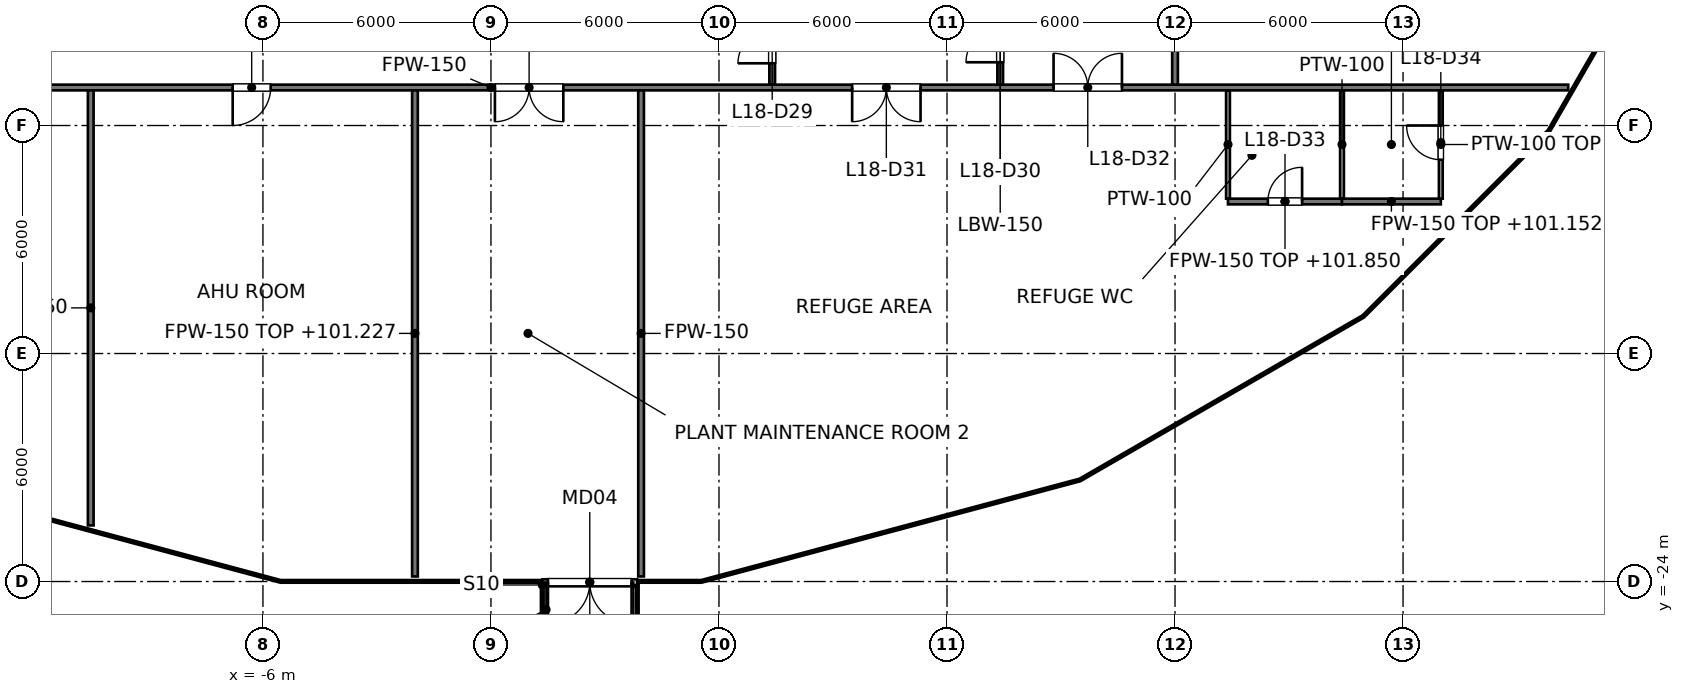
"""IFC4 building model, lengths in metres.
Left out: names, types, materials, properties, quantities, classifications, styles, units other than length and angle.
Written with IfcOpenShell. Run it as: python <this file> out.ifc"""

import sys

from ifc_helpers import new_model, si_unit, direction, frame, frame_2d, origin, place, context, subcontext, project, spatial, rectangle, extrude, element, fill, save


model = new_model("IFC4")
c1 = context("Model", 3, precision=1e-05, world=origin(), true_north=direction((0.0, 1.0)))
c2 = subcontext(c1, "Body", "Model", "MODEL_VIEW")
j1 = project(units=[si_unit("LENGTHUNIT", "METRE"), si_unit("PLANEANGLEUNIT", "RADIAN")], contexts=[c1])
p1 = place(None, origin())
s1 = spatial("IfcSite", under=j1, at=p1, CompositionType="ELEMENT")
p2 = place(p1, origin())
s2 = spatial("IfcBuilding", under=s1, at=p2, CompositionType="ELEMENT")
p3 = place(p2, frame((0.0, 0.0, 96.6)))
s3 = spatial("IfcBuildingStorey", under=s2, at=p3, CompositionType="ELEMENT", Elevation=96.6)
p4 = place(p3, frame((3.85, -24.016, 0.0), z_axis=(0.0, 0.0, 1.0), x_axis=(-1.0, 0.0, 0.0)))
e1 = element("IfcWall", 1, at=p4, inside=s3, PredefinedType="SOLIDWALL", context=c2, shape_type="SweptSolid", body=[
    extrude(rectangle(XDim=2.5, YDim=0.15, at=frame_2d((1.25, 0.0))), origin(), (0.0, 0.0, 1.0), 2.5),
])
p5 = place(p4, frame((0.15, 0.0, 0.0)))
e2 = element("IfcOpeningElement", 2, at=p5, cuts=e1, PredefinedType="OPENING", context=c2, shape_type="SweptSolid", body=[
    extrude(rectangle(XDim=2.2, YDim=2.1, at=frame_2d((1.1, 1.05))), frame((0.0, 0.075, 0.0), z_axis=(0.0, -1.0, 0.0), x_axis=(1.0, 0.0, 0.0)), (0.0, 0.0, 1.0), 0.15),
])
p6 = place(p3, frame((-28.346, -11.0, 0.0), z_axis=(0.0, 0.0, 1.0), x_axis=(1.0, 0.0, 0.0)))
e3 = element("IfcWall", 3, at=p6, inside=s3, PredefinedType="PARTITIONING", context=c2, shape_type="SweptSolid", body=[
    extrude(rectangle(XDim=56.692, YDim=0.15, at=frame_2d((28.346, 0.0))), origin(), (0.0, 0.0, 1.0), 4.327),
])
p7 = place(p6, frame((13.6, 0.0, 0.0)))
e4 = element("IfcOpeningElement", 4, at=p7, cuts=e3, PredefinedType="OPENING", context=c2, shape_type="SweptSolid", body=[
    extrude(rectangle(XDim=1.0, YDim=2.1, at=frame_2d((0.5, 1.05))), frame((0.0, 0.075, 0.0), z_axis=(0.0, -1.0, 0.0), x_axis=(1.0, 0.0, 0.0)), (0.0, 0.0, 1.0), 0.15),
])
p8 = place(p6, frame((21.55, 0.0, 0.0)))
e5 = element("IfcOpeningElement", 5, at=p8, cuts=e3, PredefinedType="OPENING", context=c2, shape_type="SweptSolid", body=[
    extrude(rectangle(XDim=1.0, YDim=2.1, at=frame_2d((0.5, 1.05))), frame((0.0, 0.075, 0.0), z_axis=(0.0, -1.0, 0.0), x_axis=(1.0, 0.0, 0.0)), (0.0, 0.0, 1.0), 0.15),
])
p9 = place(p6, frame((37.85, 0.0, 0.0)))
e6 = element("IfcOpeningElement", 6, at=p9, cuts=e3, PredefinedType="OPENING", context=c2, shape_type="SweptSolid", body=[
    extrude(rectangle(XDim=1.8, YDim=2.1, at=frame_2d((0.9, 1.05))), frame((0.0, 0.075, 0.0), z_axis=(0.0, -1.0, 0.0), x_axis=(1.0, 0.0, 0.0)), (0.0, 0.0, 1.0), 0.15),
])
p10 = place(p6, frame((43.15, 0.0, 0.0)))
e7 = element("IfcOpeningElement", 7, at=p10, cuts=e3, PredefinedType="OPENING", context=c2, shape_type="SweptSolid", body=[
    extrude(rectangle(XDim=1.8, YDim=2.1, at=frame_2d((0.9, 1.05))), frame((0.0, 0.075, 0.0), z_axis=(0.0, -1.0, 0.0), x_axis=(1.0, 0.0, 0.0)), (0.0, 0.0, 1.0), 0.15),
])
p11 = place(p6, frame((28.45, 0.0, 0.0)))
e8 = element("IfcOpeningElement", 8, at=p11, cuts=e3, PredefinedType="OPENING", context=c2, shape_type="SweptSolid", body=[
    extrude(rectangle(XDim=1.8, YDim=2.1, at=frame_2d((0.9, 1.05))), frame((0.0, 0.075, 0.0), z_axis=(0.0, -1.0, 0.0), x_axis=(1.0, 0.0, 0.0)), (0.0, 0.0, 1.0), 0.15),
])
p12 = place(p3, frame((18.0, -10.925, 0.0), z_axis=(0.0, 0.0, 1.0), x_axis=(0.0, 1.0, 0.0)))
e9 = element("IfcWall", 9, at=p12, inside=s3, PredefinedType="PARTITIONING", context=c2, shape_type="SweptSolid", body=[
    extrude(rectangle(XDim=21.85, YDim=0.15, at=frame_2d((10.925, 0.0))), origin(), (0.0, 0.0, 1.0), 4.327),
])
p13 = place(p12, frame((10.425, 0.0, 0.0)))
e10 = element("IfcOpeningElement", 10, at=p13, cuts=e9, PredefinedType="OPENING", context=c2, shape_type="SweptSolid", body=[
    extrude(rectangle(XDim=1.0, YDim=2.1, at=frame_2d((0.5, 1.05))), frame((0.0, 0.075, 0.0), z_axis=(0.0, -1.0, 0.0), x_axis=(1.0, 0.0, 0.0)), (0.0, 0.0, 1.0), 0.15),
])
p14 = place(p3, frame((-2.0, -11.075, 0.0), z_axis=(0.0, 0.0, 1.0), x_axis=(0.0, -1.0, 0.0)))
e11 = element("IfcWall", 11, at=p14, inside=s3, PredefinedType="PARTITIONING", context=c2, shape_type="SweptSolid", body=[
    extrude(rectangle(XDim=12.791, YDim=0.15, at=frame_2d((6.396, 0.0))), origin(), (0.0, 0.0, 1.0), 4.627),
])
p15 = place(p3, frame((3.95, -11.075, 0.0), z_axis=(0.0, 0.0, 1.0), x_axis=(0.0, -1.0, 0.0)))
e12 = element("IfcWall", 12, at=p15, inside=s3, PredefinedType="PARTITIONING", context=c2, shape_type="SweptSolid", body=[
    extrude(rectangle(XDim=12.791, YDim=0.15, at=frame_2d((6.396, 0.0))), origin(), (0.0, 0.0, 1.0), 4.327),
])
p16 = place(p3, frame((7.4, -10.925, 0.0), z_axis=(0.0, 0.0, 1.0), x_axis=(0.0, 1.0, 0.0)))
e13 = element("IfcWall", 13, at=p16, inside=s3, PredefinedType="PARTITIONING", context=c2, shape_type="SweptSolid", body=[
    extrude(rectangle(XDim=2.925, YDim=0.15, at=frame_2d((1.462, 0.0))), origin(), (0.0, 0.0, 1.0), 4.327),
])
p17 = place(p16, frame((0.562, 0.0, 0.0)))
e14 = element("IfcOpeningElement", 14, at=p17, cuts=e13, PredefinedType="OPENING", context=c2, shape_type="SweptSolid", body=[
    extrude(rectangle(XDim=1.8, YDim=2.1, at=frame_2d((0.9, 1.05))), frame((0.0, 0.075, 0.0), z_axis=(0.0, -1.0, 0.0), x_axis=(1.0, 0.0, 0.0)), (0.0, 0.0, 1.0), 0.15),
])
p18 = place(p3, frame((13.4, -10.925, 0.0), z_axis=(0.0, 0.0, 1.0), x_axis=(0.0, 1.0, 0.0)))
e15 = element("IfcWall", 15, at=p18, inside=s3, PredefinedType="PARTITIONING", context=c2, shape_type="SweptSolid", body=[
    extrude(rectangle(XDim=2.978, YDim=0.15, at=frame_2d((1.489, 0.0))), origin(), (0.0, 0.0, 1.0), 4.327),
])
p19 = place(p18, frame((0.589, 0.0, 0.0)))
e16 = element("IfcOpeningElement", 16, at=p19, cuts=e15, PredefinedType="OPENING", context=c2, shape_type="SweptSolid", body=[
    extrude(rectangle(XDim=1.8, YDim=2.1, at=frame_2d((0.9, 1.05))), frame((0.0, 0.075, 0.0), z_axis=(0.0, -1.0, 0.0), x_axis=(1.0, 0.0, 0.0)), (0.0, 0.0, 1.0), 0.15),
])
p20 = place(p3, frame((-10.531, -11.075, 0.0), z_axis=(0.0, 0.0, 1.0), x_axis=(0.0, -1.0, 0.0)))
e17 = element("IfcWall", 17, at=p20, inside=s3, PredefinedType="PARTITIONING", context=c2, shape_type="SweptSolid", body=[
    extrude(rectangle(XDim=11.448, YDim=0.15, at=frame_2d((5.724, 0.0))), origin(), (0.0, 0.0, 1.0), 4.327),
])
p21 = place(p3, frame((19.394, -14.0, 0.0), z_axis=(0.0, 0.0, 1.0), x_axis=(1.0, 0.0, 0.0)))
e18 = element("IfcWall", 18, at=p21, inside=s3, PredefinedType="PARTITIONING", context=c2, shape_type="SweptSolid", body=[
    extrude(rectangle(XDim=3.0, YDim=0.15, at=frame_2d((1.5, 0.0))), origin(), (0.0, 0.0, 1.0), 5.25),
])
p22 = place(p21, frame((1.05, 0.0, 0.0)))
e19 = element("IfcOpeningElement", 19, at=p22, cuts=e18, PredefinedType="OPENING", context=c2, shape_type="SweptSolid", body=[
    extrude(rectangle(XDim=0.9, YDim=2.1, at=frame_2d((0.45, 1.05))), frame((0.0, 0.075, 0.0), z_axis=(0.0, -1.0, 0.0), x_axis=(1.0, 0.0, 0.0)), (0.0, 0.0, 1.0), 0.15),
])
p23 = place(p3, frame((22.394, -14.0, 0.0), z_axis=(0.0, 0.0, 1.0), x_axis=(1.0, 0.0, 0.0)))
e20 = element("IfcWall", 20, at=p23, inside=s3, PredefinedType="PARTITIONING", context=c2, shape_type="SweptSolid", body=[
    extrude(rectangle(XDim=2.6, YDim=0.15, at=frame_2d((1.3, 0.0))), origin(), (0.0, 0.0, 1.0), 4.552),
])
for number, where, z_axis, x_axis in (
    (21, (19.394, -13.925, 0.0), (0.0, 0.0, 1.0), (0.0, 1.0, 0.0)),
    (22, (22.394, -13.925, 0.0), (0.0, 0.0, 1.0), (0.0, 1.0, 0.0)),
):
    element("IfcWall", number, at=place(p3, frame(where, z_axis=z_axis, x_axis=x_axis)), inside=s3, PredefinedType="PARTITIONING", context=c2, shape_type="SweptSolid", body=[
        extrude(rectangle(XDim=2.85, YDim=0.1, at=frame_2d((1.425, 0.0))), origin(), (0.0, 0.0, 1.0), 4.552),
    ])
p24 = place(p3, frame((24.993, -13.925, 0.0), z_axis=(0.0, 0.0, 1.0), x_axis=(0.0, 1.0, 0.0)))
e23 = element("IfcWall", 23, at=p24, inside=s3, PredefinedType="PARTITIONING", context=c2, shape_type="SweptSolid", body=[
    extrude(rectangle(XDim=2.85, YDim=0.1, at=frame_2d((1.425, 0.0))), origin(), (0.0, 0.0, 1.0), 5.25),
])
p25 = place(p24, frame((1.025, 0.0, 0.0)))
e24 = element("IfcOpeningElement", 24, at=p25, cuts=e23, PredefinedType="OPENING", context=c2, shape_type="SweptSolid", body=[
    extrude(rectangle(XDim=0.9, YDim=2.1, at=frame_2d((0.45, 1.05))), frame((0.0, 0.05, 0.0), z_axis=(0.0, -1.0, 0.0), x_axis=(1.0, 0.0, 0.0)), (0.0, 0.0, 1.0), 0.1),
])
p26 = place(p5, origin())
e25 = element("IfcDoor", 25, at=p26, inside=s3, OperationType="DOUBLE_DOOR_SINGLE_SWING", PredefinedType="DOOR", context=c2, shape_type="SweptSolid", body=[
    extrude(rectangle(XDim=2.2, YDim=2.1, at=frame_2d((1.1, 1.05))), frame((0.0, 0.025, 0.0), z_axis=(0.0, -1.0, 0.0), x_axis=(1.0, 0.0, 0.0)), (0.0, 0.0, 1.0), 0.05),
])
fill(e2, e25)
p27 = place(p8, origin())
e26 = element("IfcDoor", 26, at=p27, inside=s3, OperationType="SINGLE_SWING_LEFT", PredefinedType="DOOR", context=c2, shape_type="SweptSolid", body=[
    extrude(rectangle(XDim=1.0, YDim=2.1, at=frame_2d((0.5, 1.05))), frame((0.0, 0.025, 0.0), z_axis=(0.0, -1.0, 0.0), x_axis=(1.0, 0.0, 0.0)), (0.0, 0.0, 1.0), 0.05),
])
fill(e5, e26)
p28 = place(p17, origin())
e27 = element("IfcDoor", 27, at=p28, inside=s3, OperationType="DOUBLE_DOOR_SINGLE_SWING", PredefinedType="DOOR", context=c2, shape_type="SweptSolid", body=[
    extrude(rectangle(XDim=1.8, YDim=2.1, at=frame_2d((0.9, 1.05))), frame((0.0, 0.025, 0.0), z_axis=(0.0, -1.0, 0.0), x_axis=(1.0, 0.0, 0.0)), (0.0, 0.0, 1.0), 0.05),
])
fill(e14, e27)
p29 = place(p19, origin())
e28 = element("IfcDoor", 28, at=p29, inside=s3, OperationType="DOUBLE_DOOR_SINGLE_SWING", PredefinedType="DOOR", context=c2, shape_type="SweptSolid", body=[
    extrude(rectangle(XDim=1.8, YDim=2.1, at=frame_2d((0.9, 1.05))), frame((0.0, 0.025, 0.0), z_axis=(0.0, -1.0, 0.0), x_axis=(1.0, 0.0, 0.0)), (0.0, 0.0, 1.0), 0.05),
])
fill(e16, e28)
p30 = place(p9, origin())
e29 = element("IfcDoor", 29, at=p30, inside=s3, OperationType="DOUBLE_DOOR_SINGLE_SWING", PredefinedType="DOOR", context=c2, shape_type="SweptSolid", body=[
    extrude(rectangle(XDim=1.8, YDim=2.1, at=frame_2d((0.9, 1.05))), frame((0.0, 0.025, 0.0), z_axis=(0.0, -1.0, 0.0), x_axis=(1.0, 0.0, 0.0)), (0.0, 0.0, 1.0), 0.05),
])
fill(e6, e29)
p31 = place(p10, origin())
e30 = element("IfcDoor", 30, at=p31, inside=s3, OperationType="DOUBLE_DOOR_SINGLE_SWING", PredefinedType="DOOR", context=c2, shape_type="SweptSolid", body=[
    extrude(rectangle(XDim=1.8, YDim=2.1, at=frame_2d((0.9, 1.05))), frame((0.0, 0.025, 0.0), z_axis=(0.0, -1.0, 0.0), x_axis=(1.0, 0.0, 0.0)), (0.0, 0.0, 1.0), 0.05),
])
fill(e7, e30)
p32 = place(p22, origin())
e31 = element("IfcDoor", 31, at=p32, inside=s3, OperationType="SINGLE_SWING_RIGHT", PredefinedType="DOOR", context=c2, shape_type="SweptSolid", body=[
    extrude(rectangle(XDim=0.9, YDim=2.1, at=frame_2d((0.45, 1.05))), frame((0.0, 0.025, 0.0), z_axis=(0.0, -1.0, 0.0), x_axis=(1.0, 0.0, 0.0)), (0.0, 0.0, 1.0), 0.05),
])
fill(e19, e31)
p33 = place(p25, origin())
e32 = element("IfcDoor", 32, at=p33, inside=s3, OperationType="SINGLE_SWING_RIGHT", PredefinedType="DOOR", context=c2, shape_type="SweptSolid", body=[
    extrude(rectangle(XDim=0.9, YDim=2.1, at=frame_2d((0.45, 1.05))), frame((0.0, 0.025, 0.0), z_axis=(0.0, -1.0, 0.0), x_axis=(1.0, 0.0, 0.0)), (0.0, 0.0, 1.0), 0.05),
])
fill(e24, e32)
p34 = place(p11, origin())
e33 = element("IfcDoor", 33, at=p34, inside=s3, OperationType="DOUBLE_DOOR_SINGLE_SWING", PredefinedType="DOOR", context=c2, shape_type="SweptSolid", body=[
    extrude(rectangle(XDim=1.8, YDim=2.1, at=frame_2d((0.9, 1.05))), frame((0.0, 0.025, 0.0), z_axis=(0.0, -1.0, 0.0), x_axis=(1.0, 0.0, 0.0)), (0.0, 0.0, 1.0), 0.05),
])
fill(e8, e33)
save(model, sys.argv[1])
